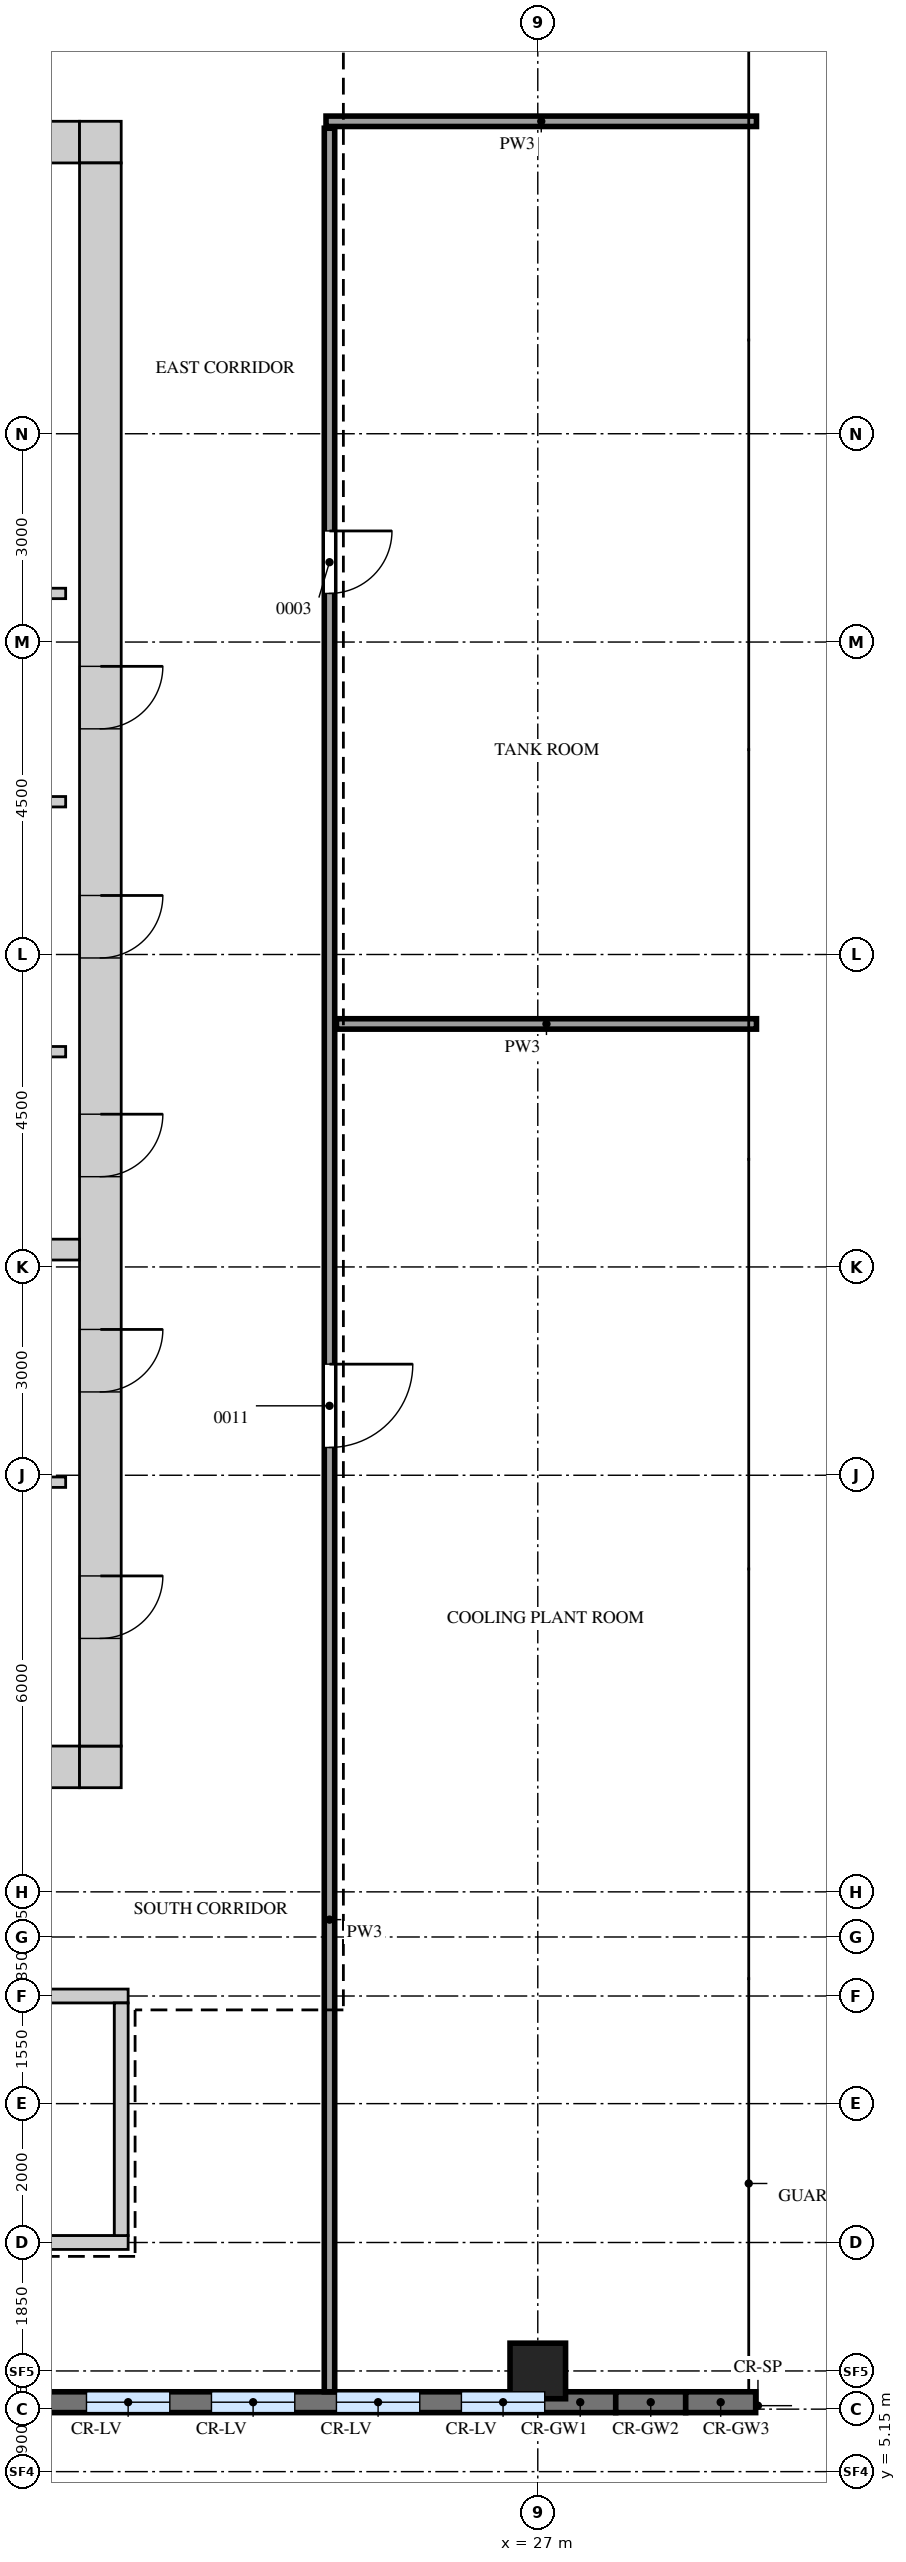
"""IFC4 building model, lengths in metres.
Left out: names, types, materials, properties, quantities, classifications, styles, units other than length and angle.
Written with IfcOpenShell. Run it as: python <this file> out.ifc"""

import sys

from ifc_helpers import new_model, si_unit, direction, frame, frame_2d, origin, origin_2d, place, context, subcontext, project, spatial, rectangle, extrude, source, transform, mapped, element, fill, save


model = new_model("IFC4")
c1 = context("Model", 3, precision=1e-05, world=origin(), true_north=direction((0.0, 1.0)))
c2 = subcontext(c1, "Body", "Model", "MODEL_VIEW")
j1 = project(units=[si_unit("LENGTHUNIT", "METRE"), si_unit("PLANEANGLEUNIT", "RADIAN")], contexts=[c1])
p1 = place(None, origin())
s1 = spatial("IfcSite", under=j1, at=p1, CompositionType="ELEMENT")
p2 = place(p1, origin())
s2 = spatial("IfcBuilding", under=s1, at=p2, CompositionType="ELEMENT")
p3 = place(p2, frame((0.0, 0.0, 343.7)))
s3 = spatial("IfcBuildingStorey", under=s2, at=p3, CompositionType="ELEMENT", Elevation=343.7)
m1 = source(origin(), c2, "Body", "SweptSolid", [
    extrude(rectangle(XDim=14.4, YDim=0.6, at=frame_2d((7.2, 0.0))), origin(), (0.0, 0.0, 1.0), 4.25),
])
p4 = place(p3, frame((6.0, 38.7, 0.0), z_axis=(0.0, 0.0, 1.0), x_axis=(1.0, 0.0, 0.0)))
e1 = element("IfcWall", 1, at=p4, inside=s3, PredefinedType="SHEAR", context=c2, shape_type="MappedRepresentation", body=[
    mapped(m1, transform((0.0, 0.0, 0.0))),
])
m2 = source(origin(), c2, "Body", "SweptSolid", [
    extrude(rectangle(XDim=0.9, YDim=2.1, at=frame_2d((0.45, 1.05))), frame((0.0, 0.31, 0.0), z_axis=(0.0, -1.0, 0.0), x_axis=(1.0, 0.0, 0.0)), (0.0, 0.0, 1.0), 0.62),
])
p5 = place(p4, frame((3.7, 0.0, 0.0)))
e2 = element("IfcOpeningElement", 2, at=p5, cuts=e1, PredefinedType="OPENING", context=c2, shape_type="MappedRepresentation", body=[
    mapped(m2, transform((0.0, 0.0, 0.0))),
])
p6 = place(p4, frame((10.4, 0.0, 0.0)))
e3 = element("IfcOpeningElement", 3, at=p6, cuts=e1, PredefinedType="OPENING", context=c2, shape_type="MappedRepresentation", body=[
    mapped(m2, transform((0.0, 0.0, 0.0))),
])
m3 = source(origin(), c2, "Body", "SweptSolid", [
    extrude(rectangle(XDim=0.6, YDim=0.6, at=frame_2d((0.3, 0.0))), origin(), (0.0, 0.0, 1.0), 4.25),
])
p7 = place(p3, frame((20.4, 38.7, 0.0), z_axis=(0.0, 0.0, 1.0), x_axis=(1.0, 0.0, 0.0)))
e4 = element("IfcWall", 4, at=p7, inside=s3, PredefinedType="SHEAR", context=c2, shape_type="MappedRepresentation", body=[
    mapped(m3, transform((0.0, 0.0, 0.0))),
])
p8 = place(p3, frame((6.0, 15.3, 0.0), z_axis=(0.0, 0.0, 1.0), x_axis=(1.0, 0.0, 0.0)))
e5 = element("IfcWall", 5, at=p8, inside=s3, PredefinedType="SHEAR", context=c2, shape_type="MappedRepresentation", body=[
    mapped(m1, transform((0.0, 0.0, 0.0))),
])
m4 = source(origin(), c2, "Body", "SweptSolid", [
    extrude(rectangle(XDim=1.2, YDim=2.1, at=frame_2d((0.6, 1.05))), frame((0.0, 0.31, 0.0), z_axis=(0.0, -1.0, 0.0), x_axis=(1.0, 0.0, 0.0)), (0.0, 0.0, 1.0), 0.62),
])
p9 = place(p8, frame((6.2, 0.0, 0.0)))
e6 = element("IfcOpeningElement", 6, at=p9, cuts=e5, PredefinedType="OPENING", context=c2, shape_type="MappedRepresentation", body=[
    mapped(m4, transform((0.0, 0.0, 0.0))),
])
p10 = place(p8, frame((2.85, 0.0, 0.0)))
e7 = element("IfcOpeningElement", 7, at=p10, cuts=e5, PredefinedType="OPENING", context=c2, shape_type="MappedRepresentation", body=[
    mapped(m4, transform((0.0, 0.0, 0.0))),
])
m5 = source(origin(), c2, "Body", "SweptSolid", [
    extrude(rectangle(XDim=1.0, YDim=2.1, at=frame_2d((0.5, 1.05))), frame((0.0, 0.31, 0.0), z_axis=(0.0, -1.0, 0.0), x_axis=(1.0, 0.0, 0.0)), (0.0, 0.0, 1.0), 0.62),
])
p11 = place(p8, frame((8.7, 0.0, 0.0)))
e8 = element("IfcOpeningElement", 8, at=p11, cuts=e5, PredefinedType="OPENING", context=c2, shape_type="MappedRepresentation", body=[
    mapped(m5, transform((0.0, 0.0, 0.0))),
])
p12 = place(p3, frame((20.4, 15.3, 0.0), z_axis=(0.0, 0.0, 1.0), x_axis=(1.0, 0.0, 0.0)))
e9 = element("IfcWall", 9, at=p12, inside=s3, PredefinedType="SHEAR", context=c2, shape_type="MappedRepresentation", body=[
    mapped(m3, transform((0.0, 0.0, 0.0))),
])
m6 = source(origin(), c2, "Body", "SweptSolid", [
    extrude(rectangle(XDim=22.8, YDim=0.6, at=frame_2d((11.4, 0.0))), origin(), (0.0, 0.0, 1.0), 4.25),
])
p13 = place(p3, frame((20.7, 15.6, 0.0), z_axis=(0.0, 0.0, 1.0), x_axis=(0.0, 1.0, 0.0)))
e10 = element("IfcWall", 10, at=p13, inside=s3, PredefinedType="SHEAR", context=c2, shape_type="MappedRepresentation", body=[
    mapped(m6, transform((0.0, 0.0, 0.0))),
])
p14 = place(p13, frame((8.2, 0.0, 0.0)))
e11 = element("IfcOpeningElement", 11, at=p14, cuts=e10, PredefinedType="OPENING", context=c2, shape_type="MappedRepresentation", body=[
    mapped(m2, transform((0.0, 0.0, 0.0))),
])
p15 = place(p13, frame((11.35, 0.0, 0.0)))
e12 = element("IfcOpeningElement", 12, at=p15, cuts=e10, PredefinedType="OPENING", context=c2, shape_type="MappedRepresentation", body=[
    mapped(m2, transform((0.0, 0.0, 0.0))),
])
p16 = place(p13, frame((14.65, 0.0, 0.0)))
e13 = element("IfcOpeningElement", 13, at=p16, cuts=e10, PredefinedType="OPENING", context=c2, shape_type="MappedRepresentation", body=[
    mapped(m2, transform((0.0, 0.0, 0.0))),
])
p17 = place(p13, frame((1.55, 0.0, 0.0)))
e14 = element("IfcOpeningElement", 14, at=p17, cuts=e10, PredefinedType="OPENING", context=c2, shape_type="MappedRepresentation", body=[
    mapped(m2, transform((0.0, 0.0, 0.0))),
])
p18 = place(p13, frame((5.1, 0.0, 0.0)))
e15 = element("IfcOpeningElement", 15, at=p18, cuts=e10, PredefinedType="OPENING", context=c2, shape_type="MappedRepresentation", body=[
    mapped(m2, transform((0.0, 0.0, 0.0))),
])
m7 = source(origin(), c2, "Body", "SweptSolid", [
    extrude(rectangle(XDim=7.2, YDim=0.2, at=frame_2d((3.6, 0.0))), origin(), (0.0, 0.0, 1.0), 4.25),
])
p19 = place(p3, frame((13.9, 12.0, 0.0), z_axis=(0.0, 0.0, 1.0), x_axis=(1.0, 0.0, 0.0)))
e16 = element("IfcWall", 16, at=p19, inside=s3, PredefinedType="SHEAR", context=c2, shape_type="MappedRepresentation", body=[
    mapped(m7, transform((0.0, 0.0, 0.0))),
])
p20 = place(p3, frame((13.9, 8.45, 0.0), z_axis=(0.0, 0.0, 1.0), x_axis=(1.0, 0.0, 0.0)))
e17 = element("IfcWall", 17, at=p20, inside=s3, PredefinedType="SHEAR", context=c2, shape_type="MappedRepresentation", body=[
    mapped(m7, transform((0.0, 0.0, 0.0))),
])
m8 = source(origin(), c2, "Body", "SweptSolid", [
    extrude(rectangle(XDim=1.2, YDim=2.1, at=frame_2d((0.6, 1.05))), frame((0.0, 0.11, 0.0), z_axis=(0.0, -1.0, 0.0), x_axis=(1.0, 0.0, 0.0)), (0.0, 0.0, 1.0), 0.22),
])
p21 = place(p20, frame((0.35, 0.0, 0.0)))
e18 = element("IfcOpeningElement", 18, at=p21, cuts=e17, PredefinedType="OPENING", context=c2, shape_type="MappedRepresentation", body=[
    mapped(m8, transform((0.0, 0.0, 0.0))),
])
m9 = source(origin(), c2, "Body", "SweptSolid", [
    extrude(rectangle(XDim=3.35, YDim=0.2, at=frame_2d((1.675, 0.0))), origin(), (0.0, 0.0, 1.0), 4.25),
])
p22 = place(p3, frame((21.0, 8.55, 0.0), z_axis=(0.0, 0.0, 1.0), x_axis=(0.0, 1.0, 0.0)))
e19 = element("IfcWall", 19, at=p22, inside=s3, PredefinedType="SHEAR", context=c2, shape_type="MappedRepresentation", body=[
    mapped(m9, transform((0.0, 0.0, 0.0))),
])
m10 = source(origin(), c2, "Body", "SweptSolid", [
    extrude(rectangle(XDim=13.2, YDim=0.3, at=frame_2d((6.6, 0.0))), origin(), (0.0, 0.0, 1.0), 4.25),
])
p23 = place(p3, frame((7.2, 22.75, 0.0), z_axis=(0.0, 0.0, 1.0), x_axis=(1.0, 0.0, 0.0)))
e20 = element("IfcWall", 20, at=p23, inside=s3, PredefinedType="STANDARD", context=c2, shape_type="MappedRepresentation", body=[
    mapped(m10, transform((0.0, 0.0, 0.0))),
])
m11 = source(origin(), c2, "Body", "SweptSolid", [
    extrude(rectangle(XDim=0.8, YDim=0.8, at=origin_2d()), origin(), (0.0, 0.0, 1.0), 4.5),
])
p24 = place(p3, frame((27.0, 6.6, 0.0), z_axis=(0.0, 0.0, 1.0), x_axis=(1.0, 0.0, 0.0)))
e21 = element("IfcColumn", 21, at=p24, inside=s3, PredefinedType="COLUMN", context=c2, shape_type="MappedRepresentation", body=[
    mapped(m11, transform((0.0, 0.0, 0.0))),
])
m12 = source(origin(), c2, "Body", "SweptSolid", [
    extrude(rectangle(XDim=15.823, YDim=0.3, at=frame_2d((7.911, 0.0))), origin(), (0.0, 0.0, 1.0), 4.5),
])
p25 = place(p3, frame((12.3, 6.15, 0.0), z_axis=(0.0, 0.0, 1.0), x_axis=(1.0, 0.0, 0.0)))
e22 = element("IfcWall", 22, at=p25, inside=s3, PredefinedType="SOLIDWALL", context=c2, shape_type="MappedRepresentation", body=[
    mapped(m12, transform((0.0, 0.0, 0.0))),
])
m13 = source(origin(), c2, "Body", "SweptSolid", [
    extrude(rectangle(XDim=1.2, YDim=2.4, at=frame_2d((0.6, 1.2))), frame((0.0, 0.16, 0.0), z_axis=(0.0, -1.0, 0.0), x_axis=(1.0, 0.0, 0.0)), (0.0, 0.0, 1.0), 0.32),
])
p26 = place(p25, frame((1.0, 0.0, 0.9)))
e23 = element("IfcOpeningElement", 23, at=p26, cuts=e22, PredefinedType="OPENING", context=c2, shape_type="MappedRepresentation", body=[
    mapped(m13, transform((0.0, 0.0, 0.0))),
])
p27 = place(p25, frame((2.8, 0.0, 0.9)))
e24 = element("IfcOpeningElement", 24, at=p27, cuts=e22, PredefinedType="OPENING", context=c2, shape_type="MappedRepresentation", body=[
    mapped(m13, transform((0.0, 0.0, 0.0))),
])
p28 = place(p25, frame((4.6, 0.0, 0.9)))
e25 = element("IfcOpeningElement", 25, at=p28, cuts=e22, PredefinedType="OPENING", context=c2, shape_type="MappedRepresentation", body=[
    mapped(m13, transform((0.0, 0.0, 0.0))),
])
p29 = place(p25, frame((6.4, 0.0, 0.9)))
e26 = element("IfcOpeningElement", 26, at=p29, cuts=e22, PredefinedType="OPENING", context=c2, shape_type="MappedRepresentation", body=[
    mapped(m13, transform((0.0, 0.0, 0.0))),
])
p30 = place(p25, frame((8.2, 0.0, 0.9)))
e27 = element("IfcOpeningElement", 27, at=p30, cuts=e22, PredefinedType="OPENING", context=c2, shape_type="MappedRepresentation", body=[
    mapped(m13, transform((0.0, 0.0, 0.0))),
])
p31 = place(p25, frame((10.0, 0.0, 0.9)))
e28 = element("IfcOpeningElement", 28, at=p31, cuts=e22, PredefinedType="OPENING", context=c2, shape_type="MappedRepresentation", body=[
    mapped(m13, transform((0.0, 0.0, 0.0))),
])
p32 = place(p25, frame((11.8, 0.0, 0.9)))
e29 = element("IfcOpeningElement", 29, at=p32, cuts=e22, PredefinedType="OPENING", context=c2, shape_type="MappedRepresentation", body=[
    mapped(m13, transform((0.0, 0.0, 0.0))),
])
p33 = place(p25, frame((13.6, 0.0, 0.9)))
e30 = element("IfcOpeningElement", 30, at=p33, cuts=e22, PredefinedType="OPENING", context=c2, shape_type="MappedRepresentation", body=[
    mapped(m13, transform((0.0, 0.0, 0.0))),
])
m14 = source(origin(), c2, "Body", "SweptSolid", [
    extrude(rectangle(XDim=1.008, YDim=0.3, at=frame_2d((0.504, 0.0))), origin(), (0.0, 0.0, 1.0), 4.05),
])
p34 = place(p3, frame((28.123, 6.15, 0.0), z_axis=(0.0, 0.0, 1.0), x_axis=(1.0, 0.0, 0.0)))
e31 = element("IfcWall", 31, at=p34, inside=s3, PredefinedType="SOLIDWALL", context=c2, shape_type="MappedRepresentation", body=[
    mapped(m14, transform((0.0, 0.0, 0.0))),
])
m15 = source(origin(), c2, "Body", "SweptSolid", [
    extrude(rectangle(XDim=1.008, YDim=0.3, at=frame_2d((0.504, 0.0))), origin(), (0.0, 0.0, 1.0), 2.3),
])
p35 = place(p3, frame((29.131, 6.15, 0.0), z_axis=(0.0, 0.0, 1.0), x_axis=(1.0, 0.0, 0.0)))
e32 = element("IfcWall", 32, at=p35, inside=s3, PredefinedType="SOLIDWALL", context=c2, shape_type="MappedRepresentation", body=[
    mapped(m15, transform((0.0, 0.0, 0.0))),
])
m16 = source(origin(), c2, "Body", "SweptSolid", [
    extrude(rectangle(XDim=32.6, YDim=0.15, at=frame_2d((16.3, 0.0))), origin(), (0.0, 0.0, 1.0), 4.3),
])
p36 = place(p3, frame((24.0, 6.3, 0.0), z_axis=(0.0, 0.0, 1.0), x_axis=(0.0, 1.0, 0.0)))
e33 = element("IfcWall", 33, at=p36, inside=s3, PredefinedType="PARTITIONING", context=c2, shape_type="MappedRepresentation", body=[
    mapped(m16, transform((0.0, 0.0, 0.0))),
])
m17 = source(origin(), c2, "Body", "SweptSolid", [
    extrude(rectangle(XDim=1.2, YDim=2.1, at=frame_2d((0.6, 1.05))), frame((0.0, 0.085, 0.0), z_axis=(0.0, -1.0, 0.0), x_axis=(1.0, 0.0, 0.0)), (0.0, 0.0, 1.0), 0.17),
])
p37 = place(p36, frame((13.6, 0.0, 0.0)))
e34 = element("IfcOpeningElement", 34, at=p37, cuts=e33, PredefinedType="OPENING", context=c2, shape_type="MappedRepresentation", body=[
    mapped(m17, transform((0.0, 0.0, 0.0))),
])
m18 = source(origin(), c2, "Body", "SweptSolid", [
    extrude(rectangle(XDim=0.9, YDim=2.1, at=frame_2d((0.45, 1.05))), frame((0.0, 0.085, 0.0), z_axis=(0.0, -1.0, 0.0), x_axis=(1.0, 0.0, 0.0)), (0.0, 0.0, 1.0), 0.17),
])
p38 = place(p36, frame((25.9, 0.0, 0.0)))
e35 = element("IfcOpeningElement", 35, at=p38, cuts=e33, PredefinedType="OPENING", context=c2, shape_type="MappedRepresentation", body=[
    mapped(m18, transform((0.0, 0.0, 0.0))),
])
m19 = source(origin(), c2, "Body", "SweptSolid", [
    extrude(rectangle(XDim=4.1, YDim=0.15, at=frame_2d((2.05, 0.0))), origin(), (0.0, 0.0, 1.0), 4.3),
])
p39 = place(p3, frame((16.1, 19.4, 0.0), z_axis=(0.0, 0.0, 1.0), x_axis=(1.0, 0.0, 0.0)))
e36 = element("IfcWall", 36, at=p39, inside=s3, PredefinedType="PARTITIONING", context=c2, shape_type="MappedRepresentation", body=[
    mapped(m19, transform((0.0, 0.0, 0.0))),
])
m20 = source(origin(), c2, "Body", "SweptSolid", [
    extrude(rectangle(XDim=13.4, YDim=0.15, at=frame_2d((6.7, 0.0))), origin(), (0.0, 0.0, 1.0), 4.3),
])
p40 = place(p3, frame((6.8, 25.6, 0.0), z_axis=(0.0, 0.0, 1.0), x_axis=(1.0, 0.0, 0.0)))
e37 = element("IfcWall", 37, at=p40, inside=s3, PredefinedType="PARTITIONING", context=c2, shape_type="MappedRepresentation", body=[
    mapped(m20, transform((0.0, 0.0, 0.0))),
])
m21 = source(origin(), c2, "Body", "SweptSolid", [
    extrude(rectangle(XDim=6.05, YDim=0.15, at=frame_2d((3.025, 0.0))), origin(), (0.0, 0.0, 1.0), 4.3),
])
p41 = place(p3, frame((24.1, 26.0, 0.0), z_axis=(0.0, 0.0, 1.0), x_axis=(1.0, 0.0, 0.0)))
e38 = element("IfcWall", 38, at=p41, inside=s3, PredefinedType="PARTITIONING", context=c2, shape_type="MappedRepresentation", body=[
    mapped(m21, transform((0.0, 0.0, 0.0))),
])
for number, where, z_axis, x_axis in (
    (39, (6.8, 29.2, 0.0), (0.0, 0.0, 1.0), (1.0, 0.0, 0.0)),
    (40, (6.8, 32.2, 0.0), (0.0, 0.0, 1.0), (1.0, 0.0, 0.0)),
):
    element("IfcWall", number, at=place(p3, frame(where, z_axis=z_axis, x_axis=x_axis)), inside=s3, PredefinedType="PARTITIONING", context=c2, shape_type="MappedRepresentation", body=[
        mapped(m20, transform((0.0, 0.0, 0.0))),
    ])
m22 = source(origin(), c2, "Body", "SweptSolid", [
    extrude(rectangle(XDim=6.2, YDim=0.15, at=frame_2d((3.1, 0.0))), origin(), (0.0, 0.0, 1.0), 4.3),
])
p42 = place(p3, frame((23.95, 39.0, 0.0), z_axis=(0.0, 0.0, 1.0), x_axis=(1.0, 0.0, 0.0)))
e41 = element("IfcWall", 41, at=p42, inside=s3, PredefinedType="PARTITIONING", context=c2, shape_type="MappedRepresentation", body=[
    mapped(m22, transform((0.0, 0.0, 0.0))),
])
m23 = source(origin(), c2, "Body", "SweptSolid", [
    extrude(rectangle(XDim=1.2, YDim=2.4, at=frame_2d((0.6, 1.2))), frame((0.0, 0.03, 0.0), z_axis=(0.0, -1.0, 0.0), x_axis=(1.0, 0.0, 0.0)), (0.0, 0.0, 1.0), 0.06),
])
p43 = place(p30, origin())
e42 = element("IfcWindow", 42, at=p43, inside=s3, PartitioningType="SINGLE_PANEL", PredefinedType="WINDOW", context=c2, shape_type="MappedRepresentation", body=[
    mapped(m23, transform((0.0, 0.0, 0.0))),
])
fill(e27, e42)
p44 = place(p31, origin())
e43 = element("IfcWindow", 43, at=p44, inside=s3, PartitioningType="SINGLE_PANEL", PredefinedType="WINDOW", context=c2, shape_type="MappedRepresentation", body=[
    mapped(m23, transform((0.0, 0.0, 0.0))),
])
fill(e28, e43)
p45 = place(p32, origin())
e44 = element("IfcWindow", 44, at=p45, inside=s3, PartitioningType="SINGLE_PANEL", PredefinedType="WINDOW", context=c2, shape_type="MappedRepresentation", body=[
    mapped(m23, transform((0.0, 0.0, 0.0))),
])
fill(e29, e44)
p46 = place(p33, origin())
e45 = element("IfcWindow", 45, at=p46, inside=s3, PartitioningType="SINGLE_PANEL", PredefinedType="WINDOW", context=c2, shape_type="MappedRepresentation", body=[
    mapped(m23, transform((0.0, 0.0, 0.0))),
])
fill(e30, e45)
m24 = source(origin(), c2, "Body", "SweptSolid", [
    extrude(rectangle(XDim=0.9, YDim=2.1, at=frame_2d((0.45, 1.05))), frame((0.0, 0.25, 0.0), z_axis=(0.0, -1.0, 0.0), x_axis=(1.0, 0.0, 0.0)), (0.0, 0.0, 1.0), 0.5),
])
p47 = place(p14, origin())
e46 = element("IfcDoor", 46, at=p47, inside=s3, OperationType="SINGLE_SWING_RIGHT", PredefinedType="DOOR", context=c2, shape_type="MappedRepresentation", body=[
    mapped(m24, transform((0.0, 0.0, 0.0))),
])
fill(e11, e46)
p48 = place(p15, origin())
e47 = element("IfcDoor", 47, at=p48, inside=s3, OperationType="SINGLE_SWING_RIGHT", PredefinedType="DOOR", context=c2, shape_type="MappedRepresentation", body=[
    mapped(m24, transform((0.0, 0.0, 0.0))),
])
fill(e12, e47)
p49 = place(p16, origin())
e48 = element("IfcDoor", 48, at=p49, inside=s3, OperationType="SINGLE_SWING_RIGHT", PredefinedType="DOOR", context=c2, shape_type="MappedRepresentation", body=[
    mapped(m24, transform((0.0, 0.0, 0.0))),
])
fill(e13, e48)
m25 = source(origin(), c2, "Body", "SweptSolid", [
    extrude(rectangle(XDim=1.2, YDim=2.1, at=frame_2d((0.6, 1.05))), frame((0.0, 0.025, 0.0), z_axis=(0.0, -1.0, 0.0), x_axis=(1.0, 0.0, 0.0)), (0.0, 0.0, 1.0), 0.05),
])
p50 = place(p37, origin())
e49 = element("IfcDoor", 49, at=p50, inside=s3, OperationType="SINGLE_SWING_RIGHT", PredefinedType="DOOR", context=c2, shape_type="MappedRepresentation", body=[
    mapped(m25, transform((0.0, 0.0, 0.0))),
])
fill(e34, e49)
m26 = source(origin(), c2, "Body", "SweptSolid", [
    extrude(rectangle(XDim=0.9, YDim=2.1, at=frame_2d((0.45, 1.05))), frame((0.0, 0.025, 0.0), z_axis=(0.0, -1.0, 0.0), x_axis=(1.0, 0.0, 0.0)), (0.0, 0.0, 1.0), 0.05),
])
p51 = place(p38, origin())
e50 = element("IfcDoor", 50, at=p51, inside=s3, OperationType="SINGLE_SWING_RIGHT", PredefinedType="DOOR", context=c2, shape_type="MappedRepresentation", body=[
    mapped(m26, transform((0.0, 0.0, 0.0))),
])
fill(e35, e50)
p52 = place(p17, origin())
e51 = element("IfcDoor", 51, at=p52, inside=s3, OperationType="SINGLE_SWING_RIGHT", PredefinedType="DOOR", context=c2, shape_type="MappedRepresentation", body=[
    mapped(m24, transform((0.0, 0.0, 0.0))),
])
fill(e14, e51)
p53 = place(p18, origin())
e52 = element("IfcDoor", 52, at=p53, inside=s3, OperationType="SINGLE_SWING_RIGHT", PredefinedType="DOOR", context=c2, shape_type="MappedRepresentation", body=[
    mapped(m24, transform((0.0, 0.0, 0.0))),
])
fill(e15, e52)
save(model, sys.argv[1])
